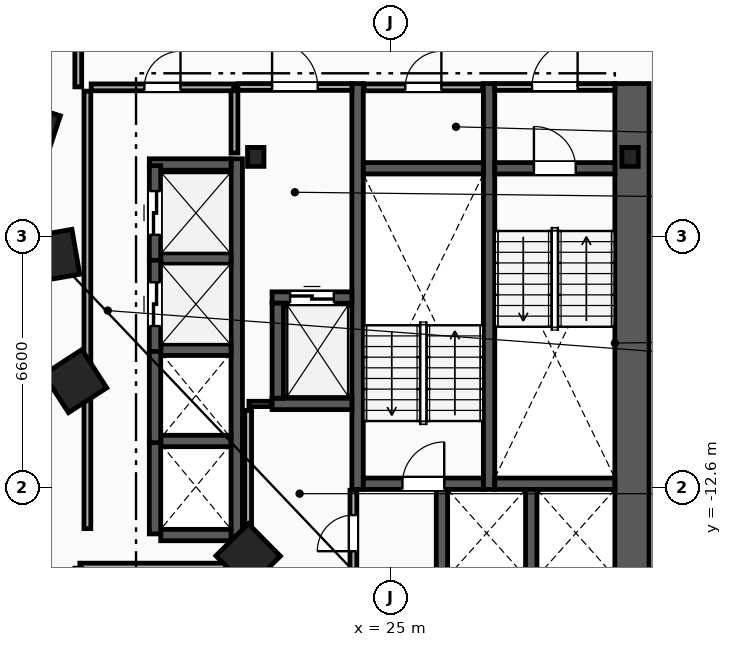
"""IFC4 building model, lengths in metres.
Left out: names, types, materials, properties, quantities, classifications, styles, units other than length and angle.
Written with IfcOpenShell. Run it as: python <this file> out.ifc"""

import sys

from ifc_helpers import new_model, si_unit, direction, frame, frame_2d, origin, origin_2d, place, context, subcontext, project, spatial, rectangle, i_section, extrude, element, fill, save


model = new_model("IFC4")
c1 = context("Model", 3, precision=1e-05, world=origin(), true_north=direction((0.0, 1.0)))
c2 = subcontext(c1, "Body", "Model", "MODEL_VIEW")
j1 = project(units=[si_unit("LENGTHUNIT", "METRE"), si_unit("PLANEANGLEUNIT", "RADIAN")], contexts=[c1])
p1 = place(None, origin())
s1 = spatial("IfcSite", under=j1, at=p1, CompositionType="ELEMENT")
p2 = place(p1, origin())
s2 = spatial("IfcBuilding", under=s1, at=p2, CompositionType="ELEMENT")
p3 = place(p2, frame((0.0, 0.0, 43.0)))
s3 = spatial("IfcBuildingStorey", under=s2, at=p3, CompositionType="ELEMENT", Elevation=43.0)
for number, where, z_axis, x_axis in (
    (1, (31.3, -3.9, 0.0), (0.0, 0.0, 1.0), (1.0, 0.0, 0.0)),
    (2, (21.45, -3.9, 0.0), (0.0, 0.0, 1.0), (1.0, 0.0, 0.0)),
):
    element("IfcColumn", number, at=place(p3, frame(where, z_axis=z_axis, x_axis=x_axis)), inside=s3, PredefinedType="COLUMN", context=c2, shape_type="SweptSolid", body=[
        extrude(i_section(OverallWidth=0.432, OverallDepth=0.498, WebThickness=0.056, FlangeThickness=0.089, FilletRadius=0.018, at=origin_2d()), origin(), (0.0, 0.0, 1.0), 3.8),
    ])
for number, where, z_axis, x_axis in (
    (3, (15.55, -3.2, 0.0), (0.0, 0.0, 1.0), (-0.315, -0.949, 0.0)),
    (4, (16.125, -6.5, 0.0), (0.0, 0.0, 1.0), (0.172, -0.985, 0.0)),
    (5, (16.7, -9.8, 0.0), (0.0, 0.0, 1.0), (0.544, -0.839, 0.0)),
    (6, (21.25, -14.4, 0.0), (0.0, 0.0, 1.0), (0.703, -0.711, 0.0)),
):
    element("IfcColumn", number, at=place(p3, frame(where, z_axis=z_axis, x_axis=x_axis)), inside=s3, PredefinedType="COLUMN", context=c2, shape_type="SweptSolid", body=[
        extrude(rectangle(XDim=1.2, YDim=1.2, at=origin_2d()), origin(), (0.0, 0.0, 1.0), 3.8),
    ])
p4 = place(p3, frame((31.35, -15.3, 0.0), z_axis=(0.0, 0.0, 1.0), x_axis=(0.0, 1.0, 0.0)))
e7 = element("IfcWall", 7, at=p4, inside=s3, PredefinedType="SHEAR", context=c2, shape_type="SweptSolid", body=[
    extrude(rectangle(XDim=13.33, YDim=0.9, at=frame_2d((6.665, 0.0))), origin(), (0.0, 0.0, 1.0), 3.5),
])
for number, where, z_axis, x_axis in (
    (8, (27.59, -12.65, 0.0), (0.0, 0.0, 1.0), (0.0, 1.0, 0.0)),
    (9, (24.13, -12.65, 0.0), (0.0, 0.0, 1.0), (0.0, 1.0, 0.0)),
):
    element("IfcWall", number, at=place(p3, frame(where, z_axis=z_axis, x_axis=x_axis)), inside=s3, PredefinedType="SHEAR", context=c2, shape_type="SweptSolid", body=[
        extrude(rectangle(XDim=10.68, YDim=0.3, at=frame_2d((5.34, 0.0))), origin(), (0.0, 0.0, 1.0), 3.5),
    ])
p5 = place(p3, frame((27.74, -4.2, 0.0), z_axis=(0.0, 0.0, 1.0), x_axis=(1.0, 0.0, 0.0)))
e10 = element("IfcWall", 10, at=p5, inside=s3, PredefinedType="SHEAR", context=c2, shape_type="SweptSolid", body=[
    extrude(rectangle(XDim=3.16, YDim=0.3, at=frame_2d((1.58, 0.0))), origin(), (0.0, 0.0, 1.0), 3.5),
])
p6 = place(p5, frame((1.03, 0.0, 0.0)))
e11 = element("IfcOpeningElement", 11, at=p6, cuts=e10, PredefinedType="OPENING", context=c2, shape_type="SweptSolid", body=[
    extrude(rectangle(XDim=1.1, YDim=2.15, at=frame_2d((0.55, 1.075))), frame((0.0, 0.16, 0.0), z_axis=(0.0, -1.0, 0.0), x_axis=(1.0, 0.0, 0.0)), (0.0, 0.0, 1.0), 0.32),
])
p7 = place(p3, frame((27.74, -12.5, 0.0), z_axis=(0.0, 0.0, 1.0), x_axis=(1.0, 0.0, 0.0)))
e12 = element("IfcWall", 12, at=p7, inside=s3, PredefinedType="SHEAR", context=c2, shape_type="SweptSolid", body=[
    extrude(rectangle(XDim=3.16, YDim=0.3, at=frame_2d((1.58, 0.0))), origin(), (0.0, 0.0, 1.0), 3.5),
])
p8 = place(p3, frame((24.28, -12.5, 0.0), z_axis=(0.0, 0.0, 1.0), x_axis=(1.0, 0.0, 0.0)))
e13 = element("IfcWall", 13, at=p8, inside=s3, PredefinedType="SHEAR", context=c2, shape_type="SweptSolid", body=[
    extrude(rectangle(XDim=3.16, YDim=0.3, at=frame_2d((1.58, 0.0))), origin(), (0.0, 0.0, 1.0), 3.5),
])
p9 = place(p8, frame((1.03, 0.0, 0.0)))
e14 = element("IfcOpeningElement", 14, at=p9, cuts=e13, PredefinedType="OPENING", context=c2, shape_type="SweptSolid", body=[
    extrude(rectangle(XDim=1.1, YDim=2.15, at=frame_2d((0.55, 1.075))), frame((0.0, 0.16, 0.0), z_axis=(0.0, -1.0, 0.0), x_axis=(1.0, 0.0, 0.0)), (0.0, 0.0, 1.0), 0.32),
])
p10 = place(p3, frame((24.28, -4.2, 0.0), z_axis=(0.0, 0.0, 1.0), x_axis=(1.0, 0.0, 0.0)))
e15 = element("IfcWall", 15, at=p10, inside=s3, PredefinedType="SHEAR", context=c2, shape_type="SweptSolid", body=[
    extrude(rectangle(XDim=3.16, YDim=0.3, at=frame_2d((1.58, 0.0))), origin(), (0.0, 0.0, 1.0), 3.5),
])
p11 = place(p3, frame((20.89, -3.8, 0.0), z_axis=(0.0, 0.0, 1.0), x_axis=(0.0, 1.0, 0.0)))
e16 = element("IfcWall", 16, at=p11, inside=s3, PredefinedType="PARTITIONING", context=c2, shape_type="SweptSolid", body=[
    extrude(rectangle(XDim=1.65, YDim=0.18, at=frame_2d((0.825, 0.0))), origin(), (0.0, 0.0, 1.0), 3.5),
])
p12 = place(p3, frame((20.98, -2.06, 0.0), z_axis=(0.0, 0.0, 1.0), x_axis=(1.0, 0.0, 0.0)))
e17 = element("IfcWall", 17, at=p12, inside=s3, PredefinedType="PARTITIONING", context=c2, shape_type="SweptSolid", body=[
    extrude(rectangle(XDim=3.0, YDim=0.18, at=frame_2d((1.5, 0.0))), origin(), (0.0, 0.0, 1.0), 3.5),
])
p13 = place(p12, frame((0.9, 0.0, 0.0)))
e18 = element("IfcOpeningElement", 18, at=p13, cuts=e17, PredefinedType="OPENING", context=c2, shape_type="SweptSolid", body=[
    extrude(rectangle(XDim=1.2, YDim=2.15, at=frame_2d((0.6, 1.075))), frame((0.0, 0.1, 0.0), z_axis=(0.0, -1.0, 0.0), x_axis=(1.0, 0.0, 0.0)), (0.0, 0.0, 1.0), 0.2),
])
p14 = place(p3, frame((27.74, -2.06, 0.0), z_axis=(0.0, 0.0, 1.0), x_axis=(1.0, 0.0, 0.0)))
e19 = element("IfcWall", 19, at=p14, inside=s3, PredefinedType="PARTITIONING", context=c2, shape_type="SweptSolid", body=[
    extrude(rectangle(XDim=3.16, YDim=0.18, at=frame_2d((1.58, 0.0))), origin(), (0.0, 0.0, 1.0), 3.5),
])
p15 = place(p14, frame((0.98, 0.0, 0.0)))
e20 = element("IfcOpeningElement", 20, at=p15, cuts=e19, PredefinedType="OPENING", context=c2, shape_type="SweptSolid", body=[
    extrude(rectangle(XDim=1.2, YDim=2.15, at=frame_2d((0.6, 1.075))), frame((0.0, 0.1, 0.0), z_axis=(0.0, -1.0, 0.0), x_axis=(1.0, 0.0, 0.0)), (0.0, 0.0, 1.0), 0.2),
])
p16 = place(p3, frame((21.88, -7.6, 0.0), z_axis=(0.0, 0.0, 1.0), x_axis=(1.0, 0.0, 0.0)))
e21 = element("IfcWall", 21, at=p16, inside=s3, PredefinedType="SHEAR", context=c2, shape_type="SweptSolid", body=[
    extrude(rectangle(XDim=2.1, YDim=0.3, at=frame_2d((1.05, 0.0))), origin(), (0.0, 0.0, 1.0), 3.5),
])
p17 = place(p16, frame((0.475, 0.0, 0.0)))
e22 = element("IfcOpeningElement", 22, at=p17, cuts=e21, PredefinedType="OPENING", context=c2, shape_type="SweptSolid", body=[
    extrude(rectangle(XDim=1.15, YDim=2.2, at=frame_2d((0.575, 1.1))), frame((0.0, 0.16, 0.0), z_axis=(0.0, -1.0, 0.0), x_axis=(1.0, 0.0, 0.0)), (0.0, 0.0, 1.0), 0.32),
])
p18 = place(p3, frame((21.88, -10.4, 0.0), z_axis=(0.0, 0.0, 1.0), x_axis=(1.0, 0.0, 0.0)))
e23 = element("IfcWall", 23, at=p18, inside=s3, PredefinedType="SHEAR", context=c2, shape_type="SweptSolid", body=[
    extrude(rectangle(XDim=2.1, YDim=0.3, at=frame_2d((1.05, 0.0))), origin(), (0.0, 0.0, 1.0), 3.5),
])
p19 = place(p3, frame((22.03, -10.25, 0.0), z_axis=(0.0, 0.0, 1.0), x_axis=(0.0, 1.0, 0.0)))
e24 = element("IfcWall", 24, at=p19, inside=s3, PredefinedType="SHEAR", context=c2, shape_type="SweptSolid", body=[
    extrude(rectangle(XDim=2.5, YDim=0.3, at=frame_2d((1.25, 0.0))), origin(), (0.0, 0.0, 1.0), 3.5),
])
for number, where, z_axis, x_axis in (
    (25, (28.7, -14.95, 0.0), (0.0, 0.0, 1.0), (0.0, 1.0, 0.0)),
    (26, (26.35, -14.95, 0.0), (0.0, 0.0, 1.0), (0.0, 1.0, 0.0)),
):
    element("IfcWall", number, at=place(p3, frame(where, z_axis=z_axis, x_axis=x_axis)), inside=s3, PredefinedType="SHEAR", context=c2, shape_type="SweptSolid", body=[
        extrude(rectangle(XDim=2.3, YDim=0.3, at=frame_2d((1.15, 0.0))), origin(), (0.0, 0.0, 1.0), 3.5),
    ])
p20 = place(p3, frame((20.95, -14.0, 0.0), z_axis=(0.0, 0.0, 1.0), x_axis=(0.0, 1.0, 0.0)))
e27 = element("IfcWall", 27, at=p20, inside=s3, PredefinedType="SHEAR", context=c2, shape_type="SweptSolid", body=[
    extrude(rectangle(XDim=10.05, YDim=0.3, at=frame_2d((5.025, 0.0))), origin(), (0.0, 0.0, 1.0), 3.5),
])
p21 = place(p3, frame((18.95, -13.85, 0.0), z_axis=(0.0, 0.0, 1.0), x_axis=(1.0, 0.0, 0.0)))
e28 = element("IfcWall", 28, at=p21, inside=s3, PredefinedType="SHEAR", context=c2, shape_type="SweptSolid", body=[
    extrude(rectangle(XDim=1.85, YDim=0.3, at=frame_2d((0.925, 0.0))), origin(), (0.0, 0.0, 1.0), 3.5),
])
p22 = place(p3, frame((18.65, -4.1, 0.0), z_axis=(0.0, 0.0, 1.0), x_axis=(1.0, 0.0, 0.0)))
e29 = element("IfcWall", 29, at=p22, inside=s3, PredefinedType="SHEAR", context=c2, shape_type="SweptSolid", body=[
    extrude(rectangle(XDim=2.15, YDim=0.3, at=frame_2d((1.075, 0.0))), origin(), (0.0, 0.0, 1.0), 3.5),
])
for number, where, z_axis, x_axis in (
    (30, (18.95, -11.375, 0.0), (0.0, 0.0, 1.0), (1.0, 0.0, 0.0)),
    (31, (18.95, -8.975, 0.0), (0.0, 0.0, 1.0), (1.0, 0.0, 0.0)),
    (32, (18.95, -6.575, 0.0), (0.0, 0.0, 1.0), (1.0, 0.0, 0.0)),
):
    element("IfcWall", number, at=place(p3, frame(where, z_axis=z_axis, x_axis=x_axis)), inside=s3, PredefinedType="SHEAR", context=c2, shape_type="SweptSolid", body=[
        extrude(rectangle(XDim=1.85, YDim=0.3, at=frame_2d((0.925, 0.0))), origin(), (0.0, 0.0, 1.0), 3.5),
    ])
for number, where, z_axis, x_axis in (
    (33, (18.8, -13.82, 0.0), (0.0, 0.0, 1.0), (0.0, 1.0, 0.0)),
    (34, (18.8, -11.42, 0.0), (0.0, 0.0, 1.0), (0.0, 1.0, 0.0)),
):
    element("IfcWall", number, at=place(p3, frame(where, z_axis=z_axis, x_axis=x_axis)), inside=s3, PredefinedType="SHEAR", context=c2, shape_type="SweptSolid", body=[
        extrude(rectangle(XDim=2.49, YDim=0.3, at=frame_2d((1.245, 0.0))), origin(), (0.0, 0.0, 1.0), 3.5),
    ])
p23 = place(p3, frame((18.8, -9.02, 0.0), z_axis=(0.0, 0.0, 1.0), x_axis=(0.0, 1.0, 0.0)))
e35 = element("IfcWall", 35, at=p23, inside=s3, PredefinedType="SHEAR", context=c2, shape_type="SweptSolid", body=[
    extrude(rectangle(XDim=2.49, YDim=0.3, at=frame_2d((1.245, 0.0))), origin(), (0.0, 0.0, 1.0), 3.5),
])
p24 = place(p23, frame((0.67, 0.0, 0.0)))
e36 = element("IfcOpeningElement", 36, at=p24, cuts=e35, PredefinedType="OPENING", context=c2, shape_type="SweptSolid", body=[
    extrude(rectangle(XDim=1.15, YDim=2.2, at=frame_2d((0.575, 1.1))), frame((0.0, 0.16, 0.0), z_axis=(0.0, -1.0, 0.0), x_axis=(1.0, 0.0, 0.0)), (0.0, 0.0, 1.0), 0.32),
])
p25 = place(p3, frame((18.8, -6.62, 0.0), z_axis=(0.0, 0.0, 1.0), x_axis=(0.0, 1.0, 0.0)))
e37 = element("IfcWall", 37, at=p25, inside=s3, PredefinedType="SHEAR", context=c2, shape_type="SweptSolid", body=[
    extrude(rectangle(XDim=2.49, YDim=0.3, at=frame_2d((1.245, 0.0))), origin(), (0.0, 0.0, 1.0), 3.5),
])
p26 = place(p25, frame((0.67, 0.0, 0.0)))
e38 = element("IfcOpeningElement", 38, at=p26, cuts=e37, PredefinedType="OPENING", context=c2, shape_type="SweptSolid", body=[
    extrude(rectangle(XDim=1.15, YDim=2.2, at=frame_2d((0.575, 1.1))), frame((0.0, 0.16, 0.0), z_axis=(0.0, -1.0, 0.0), x_axis=(1.0, 0.0, 0.0)), (0.0, 0.0, 1.0), 0.32),
])
p27 = place(p3, frame((17.02, -13.68, 0.0), z_axis=(0.0, 0.0, 1.0), x_axis=(0.0, 1.0, 0.0)))
e39 = element("IfcWall", 39, at=p27, inside=s3, PredefinedType="PARTITIONING", context=c2, shape_type="SweptSolid", body=[
    extrude(rectangle(XDim=11.51, YDim=0.18, at=frame_2d((5.755, 0.0))), origin(), (0.0, 0.0, 1.0), 3.5),
])
p28 = place(p3, frame((17.12, -2.07, 0.0), z_axis=(0.0, 0.0, 1.0), x_axis=(1.0, 0.0, 0.0)))
e40 = element("IfcWall", 40, at=p28, inside=s3, PredefinedType="PARTITIONING", context=c2, shape_type="SweptSolid", body=[
    extrude(rectangle(XDim=3.75, YDim=0.18, at=frame_2d((1.875, 0.0))), origin(), (0.0, 0.0, 1.0), 3.5),
])
p29 = place(p28, frame((1.4, 0.0, 0.0)))
e41 = element("IfcOpeningElement", 41, at=p29, cuts=e40, PredefinedType="OPENING", context=c2, shape_type="SweptSolid", body=[
    extrude(rectangle(XDim=0.95, YDim=2.1, at=frame_2d((0.475, 1.05))), frame((0.0, 0.1, 0.0), z_axis=(0.0, -1.0, 0.0), x_axis=(1.0, 0.0, 0.0)), (0.0, 0.0, 1.0), 0.2),
])
p30 = place(p3, frame((21.27, -10.4, 0.0), z_axis=(0.0, 0.0, 1.0), x_axis=(1.0, 0.0, 0.0)))
e42 = element("IfcWall", 42, at=p30, inside=s3, PredefinedType="PARTITIONING", context=c2, shape_type="SweptSolid", body=[
    extrude(rectangle(XDim=0.59, YDim=0.14, at=frame_2d((0.295, 0.0))), origin(), (0.0, 0.0, 1.0), 3.5),
])
p31 = place(p3, frame((21.25, -14.93, 0.0), z_axis=(0.0, 0.0, 1.0), x_axis=(0.0, 1.0, 0.0)))
e43 = element("IfcWall", 43, at=p31, inside=s3, PredefinedType="PARTITIONING", context=c2, shape_type="SweptSolid", body=[
    extrude(rectangle(XDim=4.36, YDim=0.18, at=frame_2d((2.18, 0.0))), origin(), (0.0, 0.0, 1.0), 3.5),
])
p32 = place(p3, frame((24.3, -2.07, 0.0), z_axis=(0.0, 0.0, 1.0), x_axis=(1.0, 0.0, 0.0)))
e44 = element("IfcWall", 44, at=p32, inside=s3, PredefinedType="PARTITIONING", context=c2, shape_type="SweptSolid", body=[
    extrude(rectangle(XDim=3.12, YDim=0.18, at=frame_2d((1.56, 0.0))), origin(), (0.0, 0.0, 1.0), 3.5),
])
p33 = place(p32, frame((1.085, 0.0, 0.0)))
e45 = element("IfcOpeningElement", 45, at=p33, cuts=e44, PredefinedType="OPENING", context=c2, shape_type="SweptSolid", body=[
    extrude(rectangle(XDim=0.95, YDim=2.1, at=frame_2d((0.475, 1.05))), frame((0.0, 0.1, 0.0), z_axis=(0.0, -1.0, 0.0), x_axis=(1.0, 0.0, 0.0)), (0.0, 0.0, 1.0), 0.2),
])
p34 = place(p3, frame((24.02, -14.93, 0.0), z_axis=(0.0, 0.0, 1.0), x_axis=(0.0, 1.0, 0.0)))
e46 = element("IfcWall", 46, at=p34, inside=s3, PredefinedType="PARTITIONING", context=c2, shape_type="SweptSolid", body=[
    extrude(rectangle(XDim=2.26, YDim=0.18, at=frame_2d((1.13, 0.0))), origin(), (0.0, 0.0, 1.0), 3.5),
])
p35 = place(p34, frame((0.655, 0.0, 0.0)))
e47 = element("IfcOpeningElement", 47, at=p35, cuts=e46, PredefinedType="OPENING", context=c2, shape_type="SweptSolid", body=[
    extrude(rectangle(XDim=0.95, YDim=2.1, at=frame_2d((0.475, 1.05))), frame((0.0, 0.1, 0.0), z_axis=(0.0, -1.0, 0.0), x_axis=(1.0, 0.0, 0.0)), (0.0, 0.0, 1.0), 0.2),
])
p36 = place(p3, frame((21.178, -14.68, 0.0), z_axis=(0.0, 0.0, 1.0), x_axis=(-1.0, 0.0, 0.0)))
e48 = element("IfcWall", 48, at=p36, inside=s3, PredefinedType="PARTITIONING", context=c2, shape_type="SweptSolid", body=[
    extrude(rectangle(XDim=4.357, YDim=0.18, at=frame_2d((2.178, 0.0))), origin(), (0.0, 0.0, 1.0), 3.5),
])
p37 = place(p3, frame((16.78, 0.329, 0.0), z_axis=(0.0, 0.0, 1.0), x_axis=(0.0, -1.0, 0.0)))
e49 = element("IfcWall", 49, at=p37, inside=s3, PredefinedType="PARTITIONING", context=c2, shape_type="SweptSolid", body=[
    extrude(rectangle(XDim=2.387, YDim=0.18, at=frame_2d((1.194, 0.0))), origin(), (0.0, 0.0, 1.0), 3.5),
])
p38 = place(p6, origin())
e50 = element("IfcDoor", 50, at=p38, inside=s3, OperationType="SINGLE_SWING_LEFT", PredefinedType="DOOR", context=c2, shape_type="SweptSolid", body=[
    extrude(rectangle(XDim=1.1, YDim=2.15, at=frame_2d((0.55, 1.075))), frame((0.0, 0.025, 0.0), z_axis=(0.0, -1.0, 0.0), x_axis=(1.0, 0.0, 0.0)), (0.0, 0.0, 1.0), 0.05),
])
fill(e11, e50)
p39 = place(p9, origin())
e51 = element("IfcDoor", 51, at=p39, inside=s3, OperationType="SINGLE_SWING_RIGHT", PredefinedType="DOOR", context=c2, shape_type="SweptSolid", body=[
    extrude(rectangle(XDim=1.1, YDim=2.15, at=frame_2d((0.55, 1.075))), frame((0.0, 0.025, 0.0), z_axis=(0.0, -1.0, 0.0), x_axis=(1.0, 0.0, 0.0)), (0.0, 0.0, 1.0), 0.05),
])
fill(e14, e51)
p40 = place(p13, origin())
e52 = element("IfcDoor", 52, at=p40, inside=s3, OperationType="SINGLE_SWING_LEFT", PredefinedType="DOOR", context=c2, shape_type="SweptSolid", body=[
    extrude(rectangle(XDim=1.2, YDim=2.15, at=frame_2d((0.6, 1.075))), frame((0.0, 0.025, 0.0), z_axis=(0.0, -1.0, 0.0), x_axis=(1.0, 0.0, 0.0)), (0.0, 0.0, 1.0), 0.05),
])
fill(e18, e52)
p41 = place(p15, origin())
e53 = element("IfcDoor", 53, at=p41, inside=s3, OperationType="SINGLE_SWING_RIGHT", PredefinedType="DOOR", context=c2, shape_type="SweptSolid", body=[
    extrude(rectangle(XDim=1.2, YDim=2.15, at=frame_2d((0.6, 1.075))), frame((0.0, 0.025, 0.0), z_axis=(0.0, -1.0, 0.0), x_axis=(1.0, 0.0, 0.0)), (0.0, 0.0, 1.0), 0.05),
])
fill(e20, e53)
p42 = place(p17, origin())
e54 = element("IfcDoor", 54, at=p42, inside=s3, OperationType="SLIDING_TO_LEFT", PredefinedType="TRAPDOOR", context=c2, shape_type="SweptSolid", body=[
    extrude(rectangle(XDim=1.15, YDim=2.2, at=frame_2d((0.575, 1.1))), frame((0.0, 0.025, 0.0), z_axis=(0.0, -1.0, 0.0), x_axis=(1.0, 0.0, 0.0)), (0.0, 0.0, 1.0), 0.05),
])
fill(e22, e54)
p43 = place(p24, origin())
e55 = element("IfcDoor", 55, at=p43, inside=s3, OperationType="SLIDING_TO_LEFT", PredefinedType="TRAPDOOR", context=c2, shape_type="SweptSolid", body=[
    extrude(rectangle(XDim=1.15, YDim=2.2, at=frame_2d((0.575, 1.1))), frame((0.0, 0.025, 0.0), z_axis=(0.0, -1.0, 0.0), x_axis=(1.0, 0.0, 0.0)), (0.0, 0.0, 1.0), 0.05),
])
fill(e36, e55)
p44 = place(p26, origin())
e56 = element("IfcDoor", 56, at=p44, inside=s3, OperationType="SLIDING_TO_LEFT", PredefinedType="TRAPDOOR", context=c2, shape_type="SweptSolid", body=[
    extrude(rectangle(XDim=1.15, YDim=2.2, at=frame_2d((0.575, 1.1))), frame((0.0, 0.025, 0.0), z_axis=(0.0, -1.0, 0.0), x_axis=(1.0, 0.0, 0.0)), (0.0, 0.0, 1.0), 0.05),
])
fill(e38, e56)
p45 = place(p29, origin())
e57 = element("IfcDoor", 57, at=p45, inside=s3, OperationType="SINGLE_SWING_RIGHT", PredefinedType="DOOR", context=c2, shape_type="SweptSolid", body=[
    extrude(rectangle(XDim=0.95, YDim=2.1, at=frame_2d((0.475, 1.05))), frame((0.0, 0.025, 0.0), z_axis=(0.0, -1.0, 0.0), x_axis=(1.0, 0.0, 0.0)), (0.0, 0.0, 1.0), 0.05),
])
fill(e41, e57)
p46 = place(p33, origin())
e58 = element("IfcDoor", 58, at=p46, inside=s3, OperationType="SINGLE_SWING_RIGHT", PredefinedType="DOOR", context=c2, shape_type="SweptSolid", body=[
    extrude(rectangle(XDim=0.95, YDim=2.1, at=frame_2d((0.475, 1.05))), frame((0.0, 0.025, 0.0), z_axis=(0.0, -1.0, 0.0), x_axis=(1.0, 0.0, 0.0)), (0.0, 0.0, 1.0), 0.05),
])
fill(e45, e58)
p47 = place(p35, origin())
e59 = element("IfcDoor", 59, at=p47, inside=s3, OperationType="SINGLE_SWING_LEFT", PredefinedType="DOOR", context=c2, shape_type="SweptSolid", body=[
    extrude(rectangle(XDim=0.95, YDim=2.1, at=frame_2d((0.475, 1.05))), frame((0.0, 0.025, 0.0), z_axis=(0.0, -1.0, 0.0), x_axis=(1.0, 0.0, 0.0)), (0.0, 0.0, 1.0), 0.05),
])
fill(e47, e59)
save(model, sys.argv[1])
